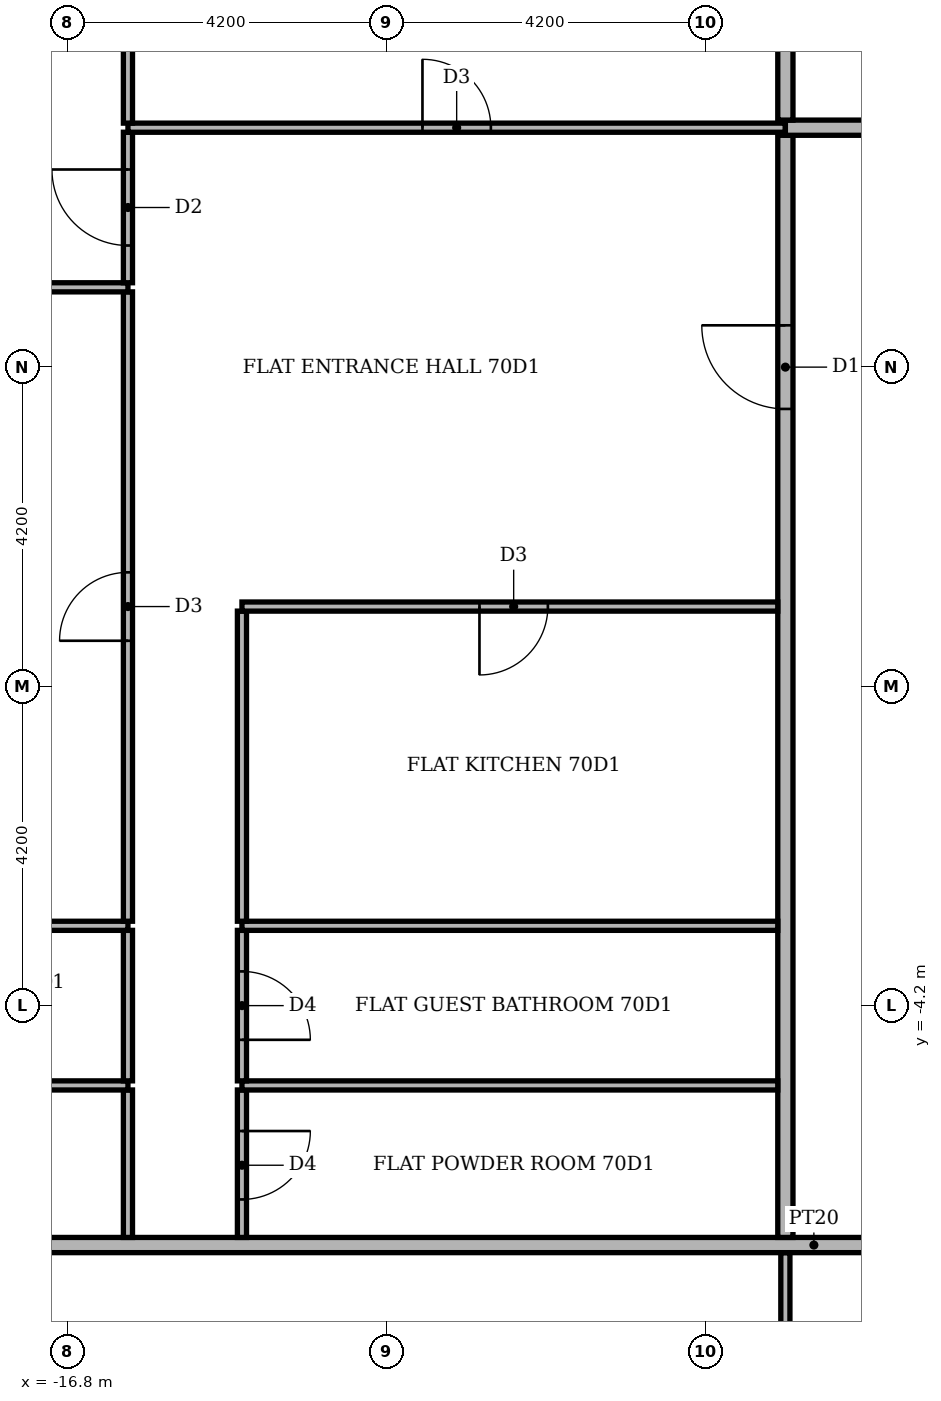
"""IFC4 building model, lengths in metres.
Left out: names, types, materials, properties, quantities, classifications, styles, units other than length and angle.
Written with IfcOpenShell. Run it as: python <this file> out.ifc"""

import sys

from ifc_helpers import new_model, si_unit, direction, frame, frame_2d, origin, place, context, subcontext, project, spatial, rectangle, extrude, element, fill, save


model = new_model("IFC4")
c1 = context("Model", 3, precision=1e-05, world=origin(), true_north=direction((0.0, 1.0)))
c2 = subcontext(c1, "Body", "Model", "MODEL_VIEW")
j1 = project(units=[si_unit("LENGTHUNIT", "METRE"), si_unit("PLANEANGLEUNIT", "RADIAN")], contexts=[c1])
p1 = place(None, origin())
s1 = spatial("IfcSite", under=j1, at=p1, CompositionType="ELEMENT")
p2 = place(p1, origin())
s2 = spatial("IfcBuilding", under=s1, at=p2, CompositionType="ELEMENT")
p3 = place(p2, frame((0.0, 0.0, 292.8)))
s3 = spatial("IfcBuildingStorey", under=s2, at=p3, CompositionType="ELEMENT", Elevation=292.8)
p4 = place(p3, frame((-7.35, -16.24, 0.0), z_axis=(0.0, 0.0, 1.0), x_axis=(0.0, 1.0, 0.0)))
e1 = element("IfcWall", 1, at=p4, inside=s3, PredefinedType="PARTITIONING", context=c2, shape_type="SweptSolid", body=[
    extrude(rectangle(XDim=8.79, YDim=0.12, at=frame_2d((4.395, 0.0))), origin(), (0.0, 0.0, 1.0), 3.55),
])
p5 = place(p4, frame((3.965, 0.0, 0.0)))
e2 = element("IfcOpeningElement", 2, at=p5, cuts=e1, PredefinedType="OPENING", context=c2, shape_type="SweptSolid", body=[
    extrude(rectangle(XDim=0.9, YDim=2.1, at=frame_2d((0.45, 1.05))), frame((0.0, 0.07, 0.0), z_axis=(0.0, -1.0, 0.0), x_axis=(1.0, 0.0, 0.0)), (0.0, 0.0, 1.0), 0.14),
])
p6 = place(p3, frame((-21.3, -7.35, 0.0), z_axis=(0.0, 0.0, 1.0), x_axis=(1.0, 0.0, 0.0)))
e3 = element("IfcWall", 3, at=p6, inside=s3, PredefinedType="PARTITIONING", context=c2, shape_type="SweptSolid", body=[
    extrude(rectangle(XDim=28.65, YDim=0.2, at=frame_2d((14.325, 0.0))), origin(), (0.0, 0.0, 1.0), 3.55),
])
p7 = place(p6, frame((16.55, 0.0, 0.0)))
e4 = element("IfcOpeningElement", 4, at=p7, cuts=e3, PredefinedType="OPENING", context=c2, shape_type="SweptSolid", body=[
    extrude(rectangle(XDim=1.1, YDim=2.4, at=frame_2d((0.55, 1.2))), frame((0.0, 0.11, 0.0), z_axis=(0.0, -1.0, 0.0), x_axis=(1.0, 0.0, 0.0)), (0.0, 0.0, 1.0), 0.22),
])
p8 = place(p3, frame((-16.0, -7.25, 0.0), z_axis=(0.0, 0.0, 1.0), x_axis=(0.0, 1.0, 0.0)))
e5 = element("IfcWall", 5, at=p8, inside=s3, PredefinedType="PARTITIONING", context=c2, shape_type="SweptSolid", body=[
    extrude(rectangle(XDim=1.94, YDim=0.12, at=frame_2d((0.97, 0.0))), origin(), (0.0, 0.0, 1.0), 3.55),
])
p9 = place(p3, frame((-14.5, -7.25, 0.0), z_axis=(0.0, 0.0, 1.0), x_axis=(0.0, 1.0, 0.0)))
e6 = element("IfcWall", 6, at=p9, inside=s3, PredefinedType="PARTITIONING", context=c2, shape_type="SweptSolid", body=[
    extrude(rectangle(XDim=1.94, YDim=0.12, at=frame_2d((0.97, 0.0))), origin(), (0.0, 0.0, 1.0), 3.55),
])
p10 = place(p9, frame((0.5, 0.0, 0.0)))
e7 = element("IfcOpeningElement", 7, at=p10, cuts=e6, PredefinedType="OPENING", context=c2, shape_type="SweptSolid", body=[
    extrude(rectangle(XDim=0.9, YDim=2.1, at=frame_2d((0.45, 1.05))), frame((0.0, 0.07, 0.0), z_axis=(0.0, -1.0, 0.0), x_axis=(1.0, 0.0, 0.0)), (0.0, 0.0, 1.0), 0.14),
])
p11 = place(p3, frame((-7.35, -7.25, 0.0), z_axis=(0.0, 0.0, 1.0), x_axis=(0.0, 1.0, 0.0)))
e8 = element("IfcWall", 8, at=p11, inside=s3, PredefinedType="PARTITIONING", context=c2, shape_type="SweptSolid", body=[
    extrude(rectangle(XDim=14.5, YDim=0.2, at=frame_2d((7.25, 0.0))), origin(), (0.0, 0.0, 1.0), 3.55),
])
p12 = place(p11, frame((10.9, 0.0, 0.0)))
e9 = element("IfcOpeningElement", 9, at=p12, cuts=e8, PredefinedType="OPENING", context=c2, shape_type="SweptSolid", body=[
    extrude(rectangle(XDim=1.1, YDim=2.4, at=frame_2d((0.55, 1.2))), frame((0.0, 0.11, 0.0), z_axis=(0.0, -1.0, 0.0), x_axis=(1.0, 0.0, 0.0)), (0.0, 0.0, 1.0), 0.22),
])
p13 = place(p3, frame((-21.3, -5.25, 0.0), z_axis=(0.0, 0.0, 1.0), x_axis=(1.0, 0.0, 0.0)))
e10 = element("IfcWall", 10, at=p13, inside=s3, PredefinedType="PARTITIONING", context=c2, shape_type="SweptSolid", body=[
    extrude(rectangle(XDim=5.3, YDim=0.12, at=frame_2d((2.65, 0.0))), origin(), (0.0, 0.0, 1.0), 3.55),
])
p14 = place(p13, frame((2.05, 0.0, 0.0)))
e11 = element("IfcOpeningElement", 11, at=p14, cuts=e10, PredefinedType="OPENING", context=c2, shape_type="SweptSolid", body=[
    extrude(rectangle(XDim=0.9, YDim=2.1, at=frame_2d((0.45, 1.05))), frame((0.0, 0.07, 0.0), z_axis=(0.0, -1.0, 0.0), x_axis=(1.0, 0.0, 0.0)), (0.0, 0.0, 1.0), 0.14),
])
p15 = place(p3, frame((-14.5, -5.25, 0.0), z_axis=(0.0, 0.0, 1.0), x_axis=(1.0, 0.0, 0.0)))
e12 = element("IfcWall", 12, at=p15, inside=s3, PredefinedType="PARTITIONING", context=c2, shape_type="SweptSolid", body=[
    extrude(rectangle(XDim=7.05, YDim=0.12, at=frame_2d((3.525, 0.0))), origin(), (0.0, 0.0, 1.0), 3.55),
])
p16 = place(p3, frame((-16.0, -5.19, 0.0), z_axis=(0.0, 0.0, 1.0), x_axis=(0.0, 1.0, 0.0)))
e13 = element("IfcWall", 13, at=p16, inside=s3, PredefinedType="PARTITIONING", context=c2, shape_type="SweptSolid", body=[
    extrude(rectangle(XDim=1.98, YDim=0.12, at=frame_2d((0.99, 0.0))), origin(), (0.0, 0.0, 1.0), 3.55),
])
p17 = place(p3, frame((-14.5, -5.19, 0.0), z_axis=(0.0, 0.0, 1.0), x_axis=(0.0, 1.0, 0.0)))
e14 = element("IfcWall", 14, at=p17, inside=s3, PredefinedType="PARTITIONING", context=c2, shape_type="SweptSolid", body=[
    extrude(rectangle(XDim=1.98, YDim=0.12, at=frame_2d((0.99, 0.0))), origin(), (0.0, 0.0, 1.0), 3.55),
])
p18 = place(p17, frame((0.54, 0.0, 0.0)))
e15 = element("IfcOpeningElement", 15, at=p18, cuts=e14, PredefinedType="OPENING", context=c2, shape_type="SweptSolid", body=[
    extrude(rectangle(XDim=0.9, YDim=2.1, at=frame_2d((0.45, 1.05))), frame((0.0, 0.07, 0.0), z_axis=(0.0, -1.0, 0.0), x_axis=(1.0, 0.0, 0.0)), (0.0, 0.0, 1.0), 0.14),
])
p19 = place(p3, frame((-21.3, -3.15, 0.0), z_axis=(0.0, 0.0, 1.0), x_axis=(1.0, 0.0, 0.0)))
e16 = element("IfcWall", 16, at=p19, inside=s3, PredefinedType="PARTITIONING", context=c2, shape_type="SweptSolid", body=[
    extrude(rectangle(XDim=5.3, YDim=0.12, at=frame_2d((2.65, 0.0))), origin(), (0.0, 0.0, 1.0), 3.55),
])
p20 = place(p19, frame((2.05, 0.0, 0.0)))
e17 = element("IfcOpeningElement", 17, at=p20, cuts=e16, PredefinedType="OPENING", context=c2, shape_type="SweptSolid", body=[
    extrude(rectangle(XDim=0.9, YDim=2.1, at=frame_2d((0.45, 1.05))), frame((0.0, 0.07, 0.0), z_axis=(0.0, -1.0, 0.0), x_axis=(1.0, 0.0, 0.0)), (0.0, 0.0, 1.0), 0.14),
])
p21 = place(p3, frame((-14.5, -3.15, 0.0), z_axis=(0.0, 0.0, 1.0), x_axis=(1.0, 0.0, 0.0)))
e18 = element("IfcWall", 18, at=p21, inside=s3, PredefinedType="PARTITIONING", context=c2, shape_type="SweptSolid", body=[
    extrude(rectangle(XDim=7.05, YDim=0.12, at=frame_2d((3.525, 0.0))), origin(), (0.0, 0.0, 1.0), 3.55),
])
p22 = place(p3, frame((-16.0, -3.09, 0.0), z_axis=(0.0, 0.0, 1.0), x_axis=(0.0, 1.0, 0.0)))
e19 = element("IfcWall", 19, at=p22, inside=s3, PredefinedType="PARTITIONING", context=c2, shape_type="SweptSolid", body=[
    extrude(rectangle(XDim=8.28, YDim=0.12, at=frame_2d((4.14, 0.0))), origin(), (0.0, 0.0, 1.0), 3.55),
])
p23 = place(p22, frame((3.69, 0.0, 0.0)))
e20 = element("IfcOpeningElement", 20, at=p23, cuts=e19, PredefinedType="OPENING", context=c2, shape_type="SweptSolid", body=[
    extrude(rectangle(XDim=0.9, YDim=2.1, at=frame_2d((0.45, 1.05))), frame((0.0, 0.07, 0.0), z_axis=(0.0, -1.0, 0.0), x_axis=(1.0, 0.0, 0.0)), (0.0, 0.0, 1.0), 0.14),
])
p24 = place(p3, frame((-14.5, -3.09, 0.0), z_axis=(0.0, 0.0, 1.0), x_axis=(0.0, 1.0, 0.0)))
e21 = element("IfcWall", 21, at=p24, inside=s3, PredefinedType="PARTITIONING", context=c2, shape_type="SweptSolid", body=[
    extrude(rectangle(XDim=4.08, YDim=0.12, at=frame_2d((2.04, 0.0))), origin(), (0.0, 0.0, 1.0), 3.55),
])
p25 = place(p3, frame((-14.5, 1.05, 0.0), z_axis=(0.0, 0.0, 1.0), x_axis=(1.0, 0.0, 0.0)))
e22 = element("IfcWall", 22, at=p25, inside=s3, PredefinedType="PARTITIONING", context=c2, shape_type="SweptSolid", body=[
    extrude(rectangle(XDim=7.05, YDim=0.12, at=frame_2d((3.525, 0.0))), origin(), (0.0, 0.0, 1.0), 3.55),
])
p26 = place(p25, frame((3.125, 0.0, 0.0)))
e23 = element("IfcOpeningElement", 23, at=p26, cuts=e22, PredefinedType="OPENING", context=c2, shape_type="SweptSolid", body=[
    extrude(rectangle(XDim=0.9, YDim=2.1, at=frame_2d((0.45, 1.05))), frame((0.0, 0.07, 0.0), z_axis=(0.0, -1.0, 0.0), x_axis=(1.0, 0.0, 0.0)), (0.0, 0.0, 1.0), 0.14),
])
p27 = place(p3, frame((-21.3, 5.25, 0.0), z_axis=(0.0, 0.0, 1.0), x_axis=(1.0, 0.0, 0.0)))
e24 = element("IfcWall", 24, at=p27, inside=s3, PredefinedType="PARTITIONING", context=c2, shape_type="SweptSolid", body=[
    extrude(rectangle(XDim=5.3, YDim=0.12, at=frame_2d((2.65, 0.0))), origin(), (0.0, 0.0, 1.0), 3.55),
])
p28 = place(p3, frame((-16.0, 5.31, 0.0), z_axis=(0.0, 0.0, 1.0), x_axis=(0.0, 1.0, 0.0)))
e25 = element("IfcWall", 25, at=p28, inside=s3, PredefinedType="PARTITIONING", context=c2, shape_type="SweptSolid", body=[
    extrude(rectangle(XDim=1.98, YDim=0.12, at=frame_2d((0.99, 0.0))), origin(), (0.0, 0.0, 1.0), 3.55),
])
p29 = place(p28, frame((0.49, 0.0, 0.0)))
e26 = element("IfcOpeningElement", 26, at=p29, cuts=e25, PredefinedType="OPENING", context=c2, shape_type="SweptSolid", body=[
    extrude(rectangle(XDim=1.0, YDim=2.1, at=frame_2d((0.5, 1.05))), frame((0.0, 0.07, 0.0), z_axis=(0.0, -1.0, 0.0), x_axis=(1.0, 0.0, 0.0)), (0.0, 0.0, 1.0), 0.14),
])
p30 = place(p3, frame((-16.0, 7.35, 0.0), z_axis=(0.0, 0.0, 1.0), x_axis=(1.0, 0.0, 0.0)))
e27 = element("IfcWall", 27, at=p30, inside=s3, PredefinedType="PARTITIONING", context=c2, shape_type="SweptSolid", body=[
    extrude(rectangle(XDim=8.65, YDim=0.12, at=frame_2d((4.325, 0.0))), origin(), (0.0, 0.0, 1.0), 3.55),
])
p31 = place(p30, frame((3.875, 0.0, 0.0)))
e28 = element("IfcOpeningElement", 28, at=p31, cuts=e27, PredefinedType="OPENING", context=c2, shape_type="SweptSolid", body=[
    extrude(rectangle(XDim=0.9, YDim=2.1, at=frame_2d((0.45, 1.05))), frame((0.0, 0.07, 0.0), z_axis=(0.0, -1.0, 0.0), x_axis=(1.0, 0.0, 0.0)), (0.0, 0.0, 1.0), 0.14),
])
p32 = place(p3, frame((-7.35, 7.35, 0.0), z_axis=(0.0, 0.0, 1.0), x_axis=(1.0, 0.0, 0.0)))
e29 = element("IfcWall", 29, at=p32, inside=s3, PredefinedType="PARTITIONING", context=c2, shape_type="SweptSolid", body=[
    extrude(rectangle(XDim=1.85, YDim=0.2, at=frame_2d((0.925, 0.0))), origin(), (0.0, 0.0, 1.0), 3.55),
])
p33 = place(p3, frame((-16.0, 7.41, 0.0), z_axis=(0.0, 0.0, 1.0), x_axis=(0.0, 1.0, 0.0)))
e30 = element("IfcWall", 30, at=p33, inside=s3, PredefinedType="PARTITIONING", context=c2, shape_type="SweptSolid", body=[
    extrude(rectangle(XDim=7.49, YDim=0.12, at=frame_2d((3.745, 0.0))), origin(), (0.0, 0.0, 1.0), 3.55),
])
p34 = place(p3, frame((-7.35, 7.45, 0.0), z_axis=(0.0, 0.0, 1.0), x_axis=(0.0, 1.0, 0.0)))
e31 = element("IfcWall", 31, at=p34, inside=s3, PredefinedType="PARTITIONING", context=c2, shape_type="SweptSolid", body=[
    extrude(rectangle(XDim=13.85, YDim=0.2, at=frame_2d((6.925, 0.0))), origin(), (0.0, 0.0, 1.0), 3.55),
])
p35 = place(p12, origin())
e32 = element("IfcDoor", 32, at=p35, inside=s3, OperationType="SINGLE_SWING_RIGHT", PredefinedType="DOOR", context=c2, shape_type="SweptSolid", body=[
    extrude(rectangle(XDim=1.1, YDim=2.4, at=frame_2d((0.55, 1.2))), frame((0.0, 0.025, 0.0), z_axis=(0.0, -1.0, 0.0), x_axis=(1.0, 0.0, 0.0)), (0.0, 0.0, 1.0), 0.05),
])
fill(e9, e32)
p36 = place(p31, origin())
e33 = element("IfcDoor", 33, at=p36, inside=s3, OperationType="SINGLE_SWING_LEFT", PredefinedType="DOOR", context=c2, shape_type="SweptSolid", body=[
    extrude(rectangle(XDim=0.9, YDim=2.1, at=frame_2d((0.45, 1.05))), frame((0.0, 0.025, 0.0), z_axis=(0.0, -1.0, 0.0), x_axis=(1.0, 0.0, 0.0)), (0.0, 0.0, 1.0), 0.05),
])
fill(e28, e33)
p37 = place(p26, frame((0.9, 0.0, 0.0), z_axis=(0.0, 0.0, 1.0), x_axis=(-1.0, 0.0, 0.0)))
e34 = element("IfcDoor", 34, at=p37, inside=s3, OperationType="SINGLE_SWING_LEFT", PredefinedType="DOOR", context=c2, shape_type="SweptSolid", body=[
    extrude(rectangle(XDim=0.9, YDim=2.1, at=frame_2d((0.45, 1.05))), frame((0.0, 0.025, 0.0), z_axis=(0.0, -1.0, 0.0), x_axis=(1.0, 0.0, 0.0)), (0.0, 0.0, 1.0), 0.05),
])
fill(e23, e34)
p38 = place(p18, frame((0.9, 0.0, 0.0), z_axis=(0.0, 0.0, 1.0), x_axis=(-1.0, 0.0, 0.0)))
e35 = element("IfcDoor", 35, at=p38, inside=s3, OperationType="SINGLE_SWING_LEFT", PredefinedType="DOOR", context=c2, shape_type="SweptSolid", body=[
    extrude(rectangle(XDim=0.9, YDim=2.1, at=frame_2d((0.45, 1.05))), frame((0.0, 0.025, 0.0), z_axis=(0.0, -1.0, 0.0), x_axis=(1.0, 0.0, 0.0)), (0.0, 0.0, 1.0), 0.05),
])
fill(e15, e35)
p39 = place(p10, frame((0.9, 0.0, 0.0), z_axis=(0.0, 0.0, 1.0), x_axis=(-1.0, 0.0, 0.0)))
e36 = element("IfcDoor", 36, at=p39, inside=s3, OperationType="SINGLE_SWING_RIGHT", PredefinedType="DOOR", context=c2, shape_type="SweptSolid", body=[
    extrude(rectangle(XDim=0.9, YDim=2.1, at=frame_2d((0.45, 1.05))), frame((0.0, 0.025, 0.0), z_axis=(0.0, -1.0, 0.0), x_axis=(1.0, 0.0, 0.0)), (0.0, 0.0, 1.0), 0.05),
])
fill(e7, e36)
p40 = place(p29, origin())
e37 = element("IfcDoor", 37, at=p40, inside=s3, OperationType="SINGLE_SWING_RIGHT", PredefinedType="DOOR", context=c2, shape_type="SweptSolid", body=[
    extrude(rectangle(XDim=1.0, YDim=2.1, at=frame_2d((0.5, 1.05))), frame((0.0, 0.025, 0.0), z_axis=(0.0, -1.0, 0.0), x_axis=(1.0, 0.0, 0.0)), (0.0, 0.0, 1.0), 0.05),
])
fill(e26, e37)
p41 = place(p23, origin())
e38 = element("IfcDoor", 38, at=p41, inside=s3, OperationType="SINGLE_SWING_LEFT", PredefinedType="DOOR", context=c2, shape_type="SweptSolid", body=[
    extrude(rectangle(XDim=0.9, YDim=2.1, at=frame_2d((0.45, 1.05))), frame((0.0, 0.025, 0.0), z_axis=(0.0, -1.0, 0.0), x_axis=(1.0, 0.0, 0.0)), (0.0, 0.0, 1.0), 0.05),
])
fill(e20, e38)
save(model, sys.argv[1])
